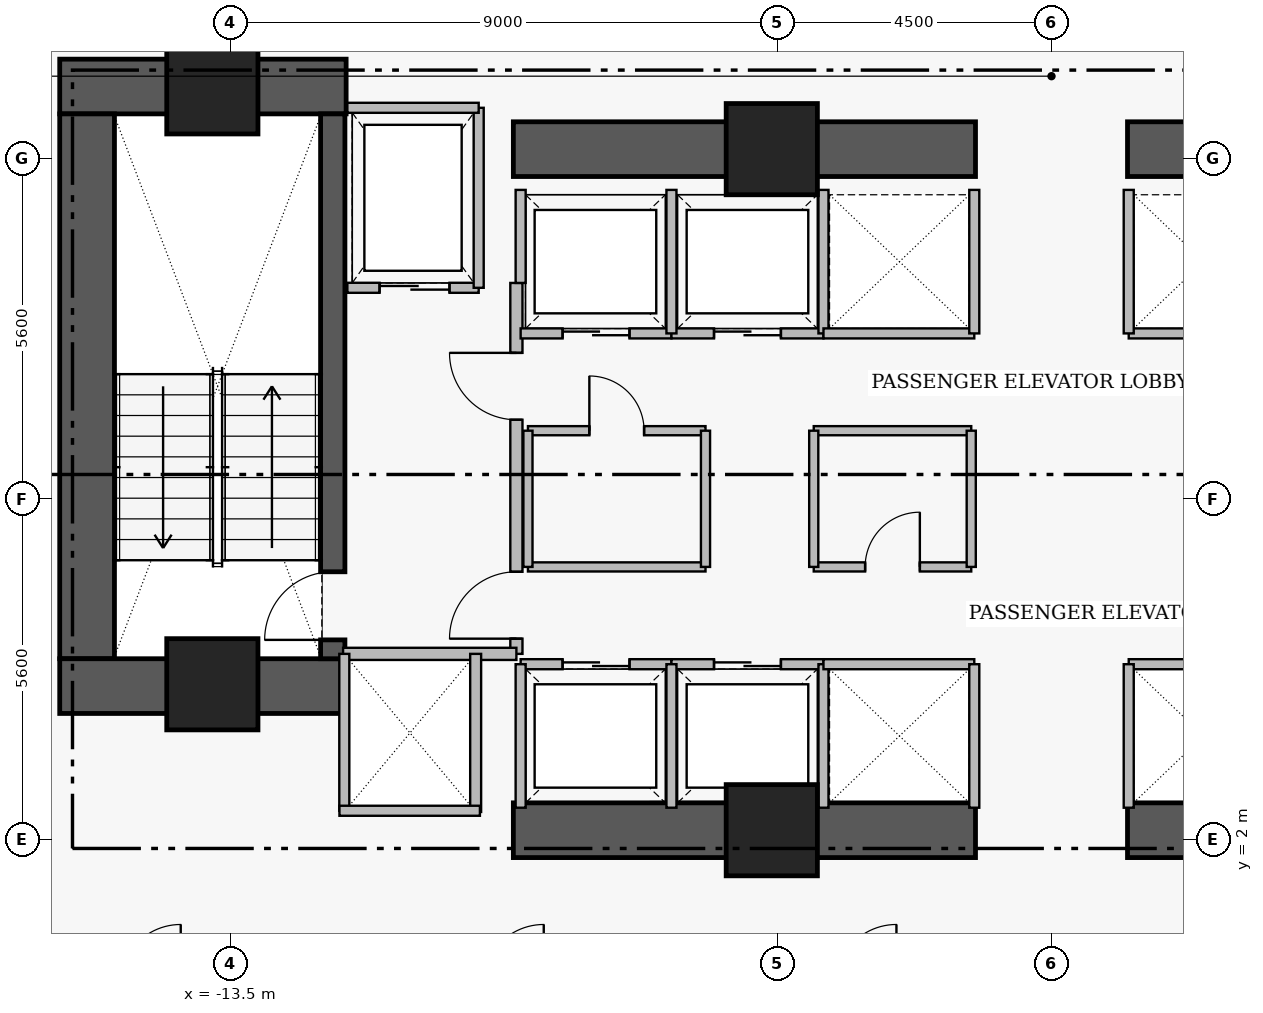
"""IFC4 building model, lengths in metres.
Left out: names, types, materials, properties, quantities, classifications, styles, units other than length and angle.
Written with IfcOpenShell. Run it as: python <this file> out.ifc"""

import sys

from ifc_helpers import new_model, si_unit, direction, frame, frame_2d, origin, origin_2d, place, context, subcontext, project, spatial, rectangle, extrude, element, fill, save


model = new_model("IFC4")
c1 = context("Model", 3, precision=1e-05, world=origin(), true_north=direction((0.0, 1.0)))
c2 = subcontext(c1, "Body", "Model", "MODEL_VIEW")
j1 = project(units=[si_unit("LENGTHUNIT", "METRE"), si_unit("PLANEANGLEUNIT", "RADIAN")], contexts=[c1])
p1 = place(None, origin())
s1 = spatial("IfcSite", under=j1, at=p1, CompositionType="ELEMENT")
p2 = place(p1, origin())
s2 = spatial("IfcBuilding", under=s1, at=p2, CompositionType="ELEMENT")
p3 = place(p2, frame((0.0, 0.0, 27.6)))
s3 = spatial("IfcBuildingStorey", under=s2, at=p3, CompositionType="ELEMENT", Elevation=27.6)
p4 = place(p3, frame((-16.31, 14.38, 0.0), z_axis=(0.0, 0.0, 1.0), x_axis=(1.0, 0.0, 0.0)))
e1 = element("IfcWall", 1, at=p4, inside=s3, PredefinedType="SHEAR", context=c2, shape_type="SweptSolid", body=[
    extrude(rectangle(XDim=4.71, YDim=0.9, at=frame_2d((2.355, 0.0))), origin(), (0.0, 0.0, 1.0), 3.46),
])
p5 = place(p3, frame((-15.86, 4.97, 0.0), z_axis=(0.0, 0.0, 1.0), x_axis=(0.0, 1.0, 0.0)))
e2 = element("IfcWall", 2, at=p5, inside=s3, PredefinedType="SHEAR", context=c2, shape_type="SweptSolid", body=[
    extrude(rectangle(XDim=8.96, YDim=0.9, at=frame_2d((4.48, 0.0))), origin(), (0.0, 0.0, 1.0), 3.46),
])
p6 = place(p3, frame((-16.31, 4.52, 0.0), z_axis=(0.0, 0.0, 1.0), x_axis=(1.0, 0.0, 0.0)))
e3 = element("IfcWall", 3, at=p6, inside=s3, PredefinedType="SHEAR", context=c2, shape_type="SweptSolid", body=[
    extrude(rectangle(XDim=4.71, YDim=0.9, at=frame_2d((2.355, 0.0))), origin(), (0.0, 0.0, 1.0), 3.46),
])
for number, where, z_axis, x_axis in (
    (4, (-8.85, 2.15, 0.0), (0.0, 0.0, 1.0), (1.0, 0.0, 0.0)),
    (5, (1.25, 2.15, 0.0), (0.0, 0.0, 1.0), (1.0, 0.0, 0.0)),
    (6, (-8.85, 13.35, 0.0), (0.0, 0.0, 1.0), (1.0, 0.0, 0.0)),
    (7, (1.25, 13.35, 0.0), (0.0, 0.0, 1.0), (1.0, 0.0, 0.0)),
):
    element("IfcWall", number, at=place(p3, frame(where, z_axis=z_axis, x_axis=x_axis)), inside=s3, PredefinedType="SHEAR", context=c2, shape_type="SweptSolid", body=[
        extrude(rectangle(XDim=7.6, YDim=0.9, at=frame_2d((3.8, 0.0))), origin(), (0.0, 0.0, 1.0), 3.43),
    ])
p7 = place(p3, frame((-11.82, 4.97, 0.0), z_axis=(0.0, 0.0, 1.0), x_axis=(0.0, 1.0, 0.0)))
e8 = element("IfcWall", 8, at=p7, inside=s3, PredefinedType="SHEAR", context=c2, shape_type="SweptSolid", body=[
    extrude(rectangle(XDim=8.96, YDim=0.4, at=frame_2d((4.48, 0.0))), origin(), (0.0, 0.0, 1.0), 3.46),
])
p8 = place(p7, frame((0.31, 0.0, 0.0)))
e9 = element("IfcOpeningElement", 9, at=p8, cuts=e8, PredefinedType="OPENING", context=c2, shape_type="SweptSolid", body=[
    extrude(rectangle(XDim=1.12, YDim=2.22, at=frame_2d((0.56, 1.11))), frame((0.0, 0.21, 0.0), z_axis=(0.0, -1.0, 0.0), x_axis=(1.0, 0.0, 0.0)), (0.0, 0.0, 1.0), 0.42),
])
for number, where, z_axis, x_axis in (
    (10, (-13.8, 14.35, 0.0), (0.0, 0.0, 1.0), (1.0, 0.0, 0.0)),
    (11, (-4.6, 13.35, 0.0), (0.0, 0.0, 1.0), (1.0, 0.0, 0.0)),
    (12, (-13.8, 4.55, 0.0), (0.0, 0.0, 1.0), (1.0, 0.0, 0.0)),
    (13, (-4.6, 2.15, 0.0), (0.0, 0.0, 1.0), (1.0, 0.0, 0.0)),
):
    element("IfcColumn", number, at=place(p3, frame(where, z_axis=z_axis, x_axis=x_axis)), inside=s3, PredefinedType="COLUMN", context=c2, shape_type="SweptSolid", body=[
        extrude(rectangle(XDim=1.5, YDim=1.5, at=origin_2d()), origin(), (0.0, 0.0, 1.0), 3.65),
    ])
p9 = place(p3, frame((-8.8, 5.05, 0.0), z_axis=(0.0, 0.0, 1.0), x_axis=(0.0, 1.0, 0.0)))
e14 = element("IfcWall", 14, at=p9, inside=s3, PredefinedType="PARTITIONING", context=c2, shape_type="SweptSolid", body=[
    extrude(rectangle(XDim=6.1, YDim=0.2, at=frame_2d((3.05, 0.0))), origin(), (0.0, 0.0, 1.0), 3.43),
])
p10 = place(p9, frame((0.25, 0.0, 0.0)))
e15 = element("IfcOpeningElement", 15, at=p10, cuts=e14, PredefinedType="OPENING", context=c2, shape_type="SweptSolid", body=[
    extrude(rectangle(XDim=1.1, YDim=2.2, at=frame_2d((0.55, 1.1))), frame((0.0, 0.11, 0.0), z_axis=(0.0, -1.0, 0.0), x_axis=(1.0, 0.0, 0.0)), (0.0, 0.0, 1.0), 0.22),
])
p11 = place(p9, frame((3.85, 0.0, 0.0)))
e16 = element("IfcOpeningElement", 16, at=p11, cuts=e14, PredefinedType="OPENING", context=c2, shape_type="SweptSolid", body=[
    extrude(rectangle(XDim=1.1, YDim=2.2, at=frame_2d((0.55, 1.1))), frame((0.0, 0.11, 0.0), z_axis=(0.0, -1.0, 0.0), x_axis=(1.0, 0.0, 0.0)), (0.0, 0.0, 1.0), 0.22),
])
p12 = place(p3, frame((-11.58, 11.07, 0.0), z_axis=(0.0, 0.0, 1.0), x_axis=(1.0, 0.0, 0.0)))
e17 = element("IfcWall", 17, at=p12, inside=s3, PredefinedType="PARTITIONING", context=c2, shape_type="SweptSolid", body=[
    extrude(rectangle(XDim=2.16, YDim=0.165, at=frame_2d((1.08, 0.0))), origin(), (0.0, 0.0, 1.0), 3.43),
])
p13 = place(p12, frame((0.53, 0.0, 0.0)))
e18 = element("IfcOpeningElement", 18, at=p13, cuts=e17, PredefinedType="OPENING", context=c2, shape_type="SweptSolid", body=[
    extrude(rectangle(XDim=1.15, YDim=2.25, at=frame_2d((0.575, 1.125))), frame((0.0, 0.093, 0.0), z_axis=(0.0, -1.0, 0.0), x_axis=(1.0, 0.0, 0.0)), (0.0, 0.0, 1.0), 0.185),
])
p14 = place(p3, frame((-8.73, 4.88, 0.0), z_axis=(0.0, 0.0, 1.0), x_axis=(1.0, 0.0, 0.0)))
e19 = element("IfcWall", 19, at=p14, inside=s3, PredefinedType="PARTITIONING", context=c2, shape_type="SweptSolid", body=[
    extrude(rectangle(XDim=2.48, YDim=0.165, at=frame_2d((1.24, 0.0))), origin(), (0.0, 0.0, 1.0), 3.43),
])
p15 = place(p14, frame((0.69, 0.0, 0.0)))
e20 = element("IfcOpeningElement", 20, at=p15, cuts=e19, PredefinedType="OPENING", context=c2, shape_type="SweptSolid", body=[
    extrude(rectangle(XDim=1.1, YDim=2.25, at=frame_2d((0.55, 1.125))), frame((0.0, 0.093, 0.0), z_axis=(0.0, -1.0, 0.0), x_axis=(1.0, 0.0, 0.0)), (0.0, 0.0, 1.0), 0.185),
])
p16 = place(p3, frame((-6.25, 4.88, 0.0), z_axis=(0.0, 0.0, 1.0), x_axis=(1.0, 0.0, 0.0)))
e21 = element("IfcWall", 21, at=p16, inside=s3, PredefinedType="PARTITIONING", context=c2, shape_type="SweptSolid", body=[
    extrude(rectangle(XDim=2.5, YDim=0.165, at=frame_2d((1.25, 0.0))), origin(), (0.0, 0.0, 1.0), 3.43),
])
p17 = place(p16, frame((0.7, 0.0, 0.0)))
e22 = element("IfcOpeningElement", 22, at=p17, cuts=e21, PredefinedType="OPENING", context=c2, shape_type="SweptSolid", body=[
    extrude(rectangle(XDim=1.1, YDim=2.25, at=frame_2d((0.55, 1.125))), frame((0.0, 0.093, 0.0), z_axis=(0.0, -1.0, 0.0), x_axis=(1.0, 0.0, 0.0)), (0.0, 0.0, 1.0), 0.185),
])
p18 = place(p3, frame((-8.73, 10.32, 0.0), z_axis=(0.0, 0.0, 1.0), x_axis=(1.0, 0.0, 0.0)))
e23 = element("IfcWall", 23, at=p18, inside=s3, PredefinedType="PARTITIONING", context=c2, shape_type="SweptSolid", body=[
    extrude(rectangle(XDim=2.48, YDim=0.165, at=frame_2d((1.24, 0.0))), origin(), (0.0, 0.0, 1.0), 3.43),
])
p19 = place(p18, frame((0.69, 0.0, 0.0)))
e24 = element("IfcOpeningElement", 24, at=p19, cuts=e23, PredefinedType="OPENING", context=c2, shape_type="SweptSolid", body=[
    extrude(rectangle(XDim=1.1, YDim=2.25, at=frame_2d((0.55, 1.125))), frame((0.0, 0.093, 0.0), z_axis=(0.0, -1.0, 0.0), x_axis=(1.0, 0.0, 0.0)), (0.0, 0.0, 1.0), 0.185),
])
p20 = place(p3, frame((-6.25, 10.32, 0.0), z_axis=(0.0, 0.0, 1.0), x_axis=(1.0, 0.0, 0.0)))
e25 = element("IfcWall", 25, at=p20, inside=s3, PredefinedType="PARTITIONING", context=c2, shape_type="SweptSolid", body=[
    extrude(rectangle(XDim=2.5, YDim=0.165, at=frame_2d((1.25, 0.0))), origin(), (0.0, 0.0, 1.0), 3.43),
])
p21 = place(p20, frame((0.7, 0.0, 0.0)))
e26 = element("IfcOpeningElement", 26, at=p21, cuts=e25, PredefinedType="OPENING", context=c2, shape_type="SweptSolid", body=[
    extrude(rectangle(XDim=1.1, YDim=2.25, at=frame_2d((0.55, 1.125))), frame((0.0, 0.093, 0.0), z_axis=(0.0, -1.0, 0.0), x_axis=(1.0, 0.0, 0.0)), (0.0, 0.0, 1.0), 0.185),
])
p22 = place(p3, frame((-8.61, 8.72, 0.0), z_axis=(0.0, 0.0, 1.0), x_axis=(1.0, 0.0, 0.0)))
e27 = element("IfcWall", 27, at=p22, inside=s3, PredefinedType="PARTITIONING", context=c2, shape_type="SweptSolid", body=[
    extrude(rectangle(XDim=2.92, YDim=0.15, at=frame_2d((1.46, 0.0))), origin(), (0.0, 0.0, 1.0), 3.43),
])
p23 = place(p22, frame((1.01, 0.0, 0.0)))
e28 = element("IfcOpeningElement", 28, at=p23, cuts=e27, PredefinedType="OPENING", context=c2, shape_type="SweptSolid", body=[
    extrude(rectangle(XDim=0.9, YDim=2.15, at=frame_2d((0.45, 1.075))), frame((0.0, 0.085, 0.0), z_axis=(0.0, -1.0, 0.0), x_axis=(1.0, 0.0, 0.0)), (0.0, 0.0, 1.0), 0.17),
])
p24 = place(p3, frame((-3.91, 6.48, 0.0), z_axis=(0.0, 0.0, 1.0), x_axis=(1.0, 0.0, 0.0)))
e29 = element("IfcWall", 29, at=p24, inside=s3, PredefinedType="PARTITIONING", context=c2, shape_type="SweptSolid", body=[
    extrude(rectangle(XDim=2.59, YDim=0.15, at=frame_2d((1.295, 0.0))), origin(), (0.0, 0.0, 1.0), 3.43),
])
p25 = place(p24, frame((0.845, 0.0, 0.0)))
e30 = element("IfcOpeningElement", 30, at=p25, cuts=e29, PredefinedType="OPENING", context=c2, shape_type="SweptSolid", body=[
    extrude(rectangle(XDim=0.9, YDim=2.15, at=frame_2d((0.45, 1.075))), frame((0.0, 0.085, 0.0), z_axis=(0.0, -1.0, 0.0), x_axis=(1.0, 0.0, 0.0)), (0.0, 0.0, 1.0), 0.17),
])
p26 = place(p3, frame((-11.65, 5.05, 0.0), z_axis=(0.0, 0.0, 1.0), x_axis=(1.0, 0.0, 0.0)))
e31 = element("IfcWall", 31, at=p26, inside=s3, PredefinedType="PARTITIONING", context=c2, shape_type="SweptSolid", body=[
    extrude(rectangle(XDim=2.85, YDim=0.2, at=frame_2d((1.425, 0.0))), origin(), (0.0, 0.0, 1.0), 3.43),
])
p27 = place(p3, frame((-9.42, 11.07, 0.0), z_axis=(0.0, 0.0, 1.0), x_axis=(0.0, 1.0, 0.0)))
e32 = element("IfcWall", 32, at=p27, inside=s3, PredefinedType="PARTITIONING", context=c2, shape_type="SweptSolid", body=[
    extrude(rectangle(XDim=2.96, YDim=0.165, at=frame_2d((1.48, 0.0))), origin(), (0.0, 0.0, 1.0), 3.43),
])
p28 = place(p3, frame((-11.58, 14.03, 0.0), z_axis=(0.0, 0.0, 1.0), x_axis=(1.0, 0.0, 0.0)))
e33 = element("IfcWall", 33, at=p28, inside=s3, PredefinedType="PARTITIONING", context=c2, shape_type="SweptSolid", body=[
    extrude(rectangle(XDim=2.16, YDim=0.165, at=frame_2d((1.08, 0.0))), origin(), (0.0, 0.0, 1.0), 3.43),
])
for number, where, z_axis, x_axis in (
    (34, (-8.73, 2.52, 0.0), (0.0, 0.0, 1.0), (0.0, 1.0, 0.0)),
    (35, (-6.25, 2.52, 0.0), (0.0, 0.0, 1.0), (0.0, 1.0, 0.0)),
    (36, (-3.75, 2.52, 0.0), (0.0, 0.0, 1.0), (0.0, 1.0, 0.0)),
):
    element("IfcWall", number, at=place(p3, frame(where, z_axis=z_axis, x_axis=x_axis)), inside=s3, PredefinedType="PARTITIONING", context=c2, shape_type="SweptSolid", body=[
        extrude(rectangle(XDim=2.36, YDim=0.165, at=frame_2d((1.18, 0.0))), origin(), (0.0, 0.0, 1.0), 3.43),
    ])
p29 = place(p3, frame((-8.73, 11.15, 0.0), z_axis=(0.0, 0.0, 1.0), x_axis=(0.0, 1.0, 0.0)))
e37 = element("IfcWall", 37, at=p29, inside=s3, PredefinedType="PARTITIONING", context=c2, shape_type="SweptSolid", body=[
    extrude(rectangle(XDim=1.53, YDim=0.165, at=frame_2d((0.765, 0.0))), origin(), (0.0, 0.0, 1.0), 3.43),
])
for number, where, z_axis, x_axis in (
    (38, (-6.25, 10.32, 0.0), (0.0, 0.0, 1.0), (0.0, 1.0, 0.0)),
    (39, (-3.75, 10.32, 0.0), (0.0, 0.0, 1.0), (0.0, 1.0, 0.0)),
):
    element("IfcWall", number, at=place(p3, frame(where, z_axis=z_axis, x_axis=x_axis)), inside=s3, PredefinedType="PARTITIONING", context=c2, shape_type="SweptSolid", body=[
        extrude(rectangle(XDim=2.36, YDim=0.165, at=frame_2d((1.18, 0.0))), origin(), (0.0, 0.0, 1.0), 3.43),
    ])
p30 = place(p3, frame((-3.75, 4.88, 0.0), z_axis=(0.0, 0.0, 1.0), x_axis=(1.0, 0.0, 0.0)))
e40 = element("IfcWall", 40, at=p30, inside=s3, PredefinedType="PARTITIONING", context=c2, shape_type="SweptSolid", body=[
    extrude(rectangle(XDim=2.48, YDim=0.165, at=frame_2d((1.24, 0.0))), origin(), (0.0, 0.0, 1.0), 3.43),
])
p31 = place(p3, frame((-1.27, 2.52, 0.0), z_axis=(0.0, 0.0, 1.0), x_axis=(0.0, 1.0, 0.0)))
e41 = element("IfcWall", 41, at=p31, inside=s3, PredefinedType="PARTITIONING", context=c2, shape_type="SweptSolid", body=[
    extrude(rectangle(XDim=2.36, YDim=0.165, at=frame_2d((1.18, 0.0))), origin(), (0.0, 0.0, 1.0), 3.43),
])
p32 = place(p3, frame((1.27, 4.88, 0.0), z_axis=(0.0, 0.0, 1.0), x_axis=(1.0, 0.0, 0.0)))
e42 = element("IfcWall", 42, at=p32, inside=s3, PredefinedType="PARTITIONING", context=c2, shape_type="SweptSolid", body=[
    extrude(rectangle(XDim=2.48, YDim=0.165, at=frame_2d((1.24, 0.0))), origin(), (0.0, 0.0, 1.0), 3.43),
])
p33 = place(p3, frame((1.27, 2.52, 0.0), z_axis=(0.0, 0.0, 1.0), x_axis=(0.0, 1.0, 0.0)))
e43 = element("IfcWall", 43, at=p33, inside=s3, PredefinedType="PARTITIONING", context=c2, shape_type="SweptSolid", body=[
    extrude(rectangle(XDim=2.36, YDim=0.165, at=frame_2d((1.18, 0.0))), origin(), (0.0, 0.0, 1.0), 3.43),
])
p34 = place(p3, frame((-3.75, 10.32, 0.0), z_axis=(0.0, 0.0, 1.0), x_axis=(1.0, 0.0, 0.0)))
e44 = element("IfcWall", 44, at=p34, inside=s3, PredefinedType="PARTITIONING", context=c2, shape_type="SweptSolid", body=[
    extrude(rectangle(XDim=2.48, YDim=0.165, at=frame_2d((1.24, 0.0))), origin(), (0.0, 0.0, 1.0), 3.43),
])
p35 = place(p3, frame((-1.27, 10.32, 0.0), z_axis=(0.0, 0.0, 1.0), x_axis=(0.0, 1.0, 0.0)))
e45 = element("IfcWall", 45, at=p35, inside=s3, PredefinedType="PARTITIONING", context=c2, shape_type="SweptSolid", body=[
    extrude(rectangle(XDim=2.36, YDim=0.165, at=frame_2d((1.18, 0.0))), origin(), (0.0, 0.0, 1.0), 3.43),
])
p36 = place(p3, frame((1.27, 10.32, 0.0), z_axis=(0.0, 0.0, 1.0), x_axis=(1.0, 0.0, 0.0)))
e46 = element("IfcWall", 46, at=p36, inside=s3, PredefinedType="PARTITIONING", context=c2, shape_type="SweptSolid", body=[
    extrude(rectangle(XDim=2.48, YDim=0.165, at=frame_2d((1.24, 0.0))), origin(), (0.0, 0.0, 1.0), 3.43),
])
p37 = place(p3, frame((1.27, 10.32, 0.0), z_axis=(0.0, 0.0, 1.0), x_axis=(0.0, 1.0, 0.0)))
e47 = element("IfcWall", 47, at=p37, inside=s3, PredefinedType="PARTITIONING", context=c2, shape_type="SweptSolid", body=[
    extrude(rectangle(XDim=2.36, YDim=0.165, at=frame_2d((1.18, 0.0))), origin(), (0.0, 0.0, 1.0), 3.43),
])
p38 = place(p3, frame((-9.47, 2.45, 0.0), z_axis=(0.0, 0.0, 1.0), x_axis=(0.0, 1.0, 0.0)))
e48 = element("IfcWall", 48, at=p38, inside=s3, PredefinedType="PARTITIONING", context=c2, shape_type="SweptSolid", body=[
    extrude(rectangle(XDim=2.6, YDim=0.18, at=frame_2d((1.3, 0.0))), origin(), (0.0, 0.0, 1.0), 3.43),
])
p39 = place(p3, frame((-11.63, 2.47, 0.0), z_axis=(0.0, 0.0, 1.0), x_axis=(0.0, 1.0, 0.0)))
e49 = element("IfcWall", 49, at=p39, inside=s3, PredefinedType="PARTITIONING", context=c2, shape_type="SweptSolid", body=[
    extrude(rectangle(XDim=2.58, YDim=0.165, at=frame_2d((1.29, 0.0))), origin(), (0.0, 0.0, 1.0), 3.43),
])
p40 = place(p3, frame((-11.71, 2.47, 0.0), z_axis=(0.0, 0.0, 1.0), x_axis=(1.0, 0.0, 0.0)))
e50 = element("IfcWall", 50, at=p40, inside=s3, PredefinedType="PARTITIONING", context=c2, shape_type="SweptSolid", body=[
    extrude(rectangle(XDim=2.31, YDim=0.165, at=frame_2d((1.155, 0.0))), origin(), (0.0, 0.0, 1.0), 2.03),
])
p41 = place(p3, frame((-8.61, 6.48, 0.0), z_axis=(0.0, 0.0, 1.0), x_axis=(1.0, 0.0, 0.0)))
e51 = element("IfcWall", 51, at=p41, inside=s3, PredefinedType="PARTITIONING", context=c2, shape_type="SweptSolid", body=[
    extrude(rectangle(XDim=2.92, YDim=0.15, at=frame_2d((1.46, 0.0))), origin(), (0.0, 0.0, 1.0), 3.43),
])
for number, where, z_axis, x_axis in (
    (52, (-8.61, 6.48, 0.0), (0.0, 0.0, 1.0), (0.0, 1.0, 0.0)),
    (53, (-5.69, 6.48, 0.0), (0.0, 0.0, 1.0), (0.0, 1.0, 0.0)),
):
    element("IfcWall", number, at=place(p3, frame(where, z_axis=z_axis, x_axis=x_axis)), inside=s3, PredefinedType="PARTITIONING", context=c2, shape_type="SweptSolid", body=[
        extrude(rectangle(XDim=2.24, YDim=0.15, at=frame_2d((1.12, 0.0))), origin(), (0.0, 0.0, 1.0), 3.43),
    ])
p42 = place(p3, frame((-3.91, 8.72, 0.0), z_axis=(0.0, 0.0, 1.0), x_axis=(1.0, 0.0, 0.0)))
e54 = element("IfcWall", 54, at=p42, inside=s3, PredefinedType="PARTITIONING", context=c2, shape_type="SweptSolid", body=[
    extrude(rectangle(XDim=2.59, YDim=0.15, at=frame_2d((1.295, 0.0))), origin(), (0.0, 0.0, 1.0), 3.43),
])
for number, where, z_axis, x_axis in (
    (55, (-3.91, 6.48, 0.0), (0.0, 0.0, 1.0), (0.0, 1.0, 0.0)),
    (56, (-1.32, 6.48, 0.0), (0.0, 0.0, 1.0), (0.0, 1.0, 0.0)),
):
    element("IfcWall", number, at=place(p3, frame(where, z_axis=z_axis, x_axis=x_axis)), inside=s3, PredefinedType="PARTITIONING", context=c2, shape_type="SweptSolid", body=[
        extrude(rectangle(XDim=2.24, YDim=0.15, at=frame_2d((1.12, 0.0))), origin(), (0.0, 0.0, 1.0), 3.43),
    ])
p43 = place(p8, origin())
e57 = element("IfcDoor", 57, at=p43, inside=s3, OperationType="SINGLE_SWING_LEFT", PredefinedType="DOOR", context=c2, shape_type="SweptSolid", body=[
    extrude(rectangle(XDim=1.12, YDim=2.22, at=frame_2d((0.56, 1.11))), frame((0.0, 0.025, 0.0), z_axis=(0.0, -1.0, 0.0), x_axis=(1.0, 0.0, 0.0)), (0.0, 0.0, 1.0), 0.05),
])
fill(e9, e57)
p44 = place(p10, origin())
e58 = element("IfcDoor", 58, at=p44, inside=s3, OperationType="SINGLE_SWING_LEFT", PredefinedType="DOOR", context=c2, shape_type="SweptSolid", body=[
    extrude(rectangle(XDim=1.1, YDim=2.2, at=frame_2d((0.55, 1.1))), frame((0.0, 0.025, 0.0), z_axis=(0.0, -1.0, 0.0), x_axis=(1.0, 0.0, 0.0)), (0.0, 0.0, 1.0), 0.05),
])
fill(e15, e58)
p45 = place(p11, origin())
e59 = element("IfcDoor", 59, at=p45, inside=s3, OperationType="SINGLE_SWING_RIGHT", PredefinedType="DOOR", context=c2, shape_type="SweptSolid", body=[
    extrude(rectangle(XDim=1.1, YDim=2.2, at=frame_2d((0.55, 1.1))), frame((0.0, 0.025, 0.0), z_axis=(0.0, -1.0, 0.0), x_axis=(1.0, 0.0, 0.0)), (0.0, 0.0, 1.0), 0.05),
])
fill(e16, e59)
p46 = place(p13, origin())
e60 = element("IfcDoor", 60, at=p46, inside=s3, OperationType="SLIDING_TO_LEFT", PredefinedType="DOOR", context=c2, shape_type="SweptSolid", body=[
    extrude(rectangle(XDim=1.15, YDim=2.25, at=frame_2d((0.575, 1.125))), frame((0.0, 0.025, 0.0), z_axis=(0.0, -1.0, 0.0), x_axis=(1.0, 0.0, 0.0)), (0.0, 0.0, 1.0), 0.05),
])
fill(e18, e60)
p47 = place(p15, origin())
e61 = element("IfcDoor", 61, at=p47, inside=s3, OperationType="SLIDING_TO_LEFT", PredefinedType="DOOR", context=c2, shape_type="SweptSolid", body=[
    extrude(rectangle(XDim=1.1, YDim=2.25, at=frame_2d((0.55, 1.125))), frame((0.0, 0.025, 0.0), z_axis=(0.0, -1.0, 0.0), x_axis=(1.0, 0.0, 0.0)), (0.0, 0.0, 1.0), 0.05),
])
fill(e20, e61)
p48 = place(p17, origin())
e62 = element("IfcDoor", 62, at=p48, inside=s3, OperationType="SLIDING_TO_LEFT", PredefinedType="DOOR", context=c2, shape_type="SweptSolid", body=[
    extrude(rectangle(XDim=1.1, YDim=2.25, at=frame_2d((0.55, 1.125))), frame((0.0, 0.025, 0.0), z_axis=(0.0, -1.0, 0.0), x_axis=(1.0, 0.0, 0.0)), (0.0, 0.0, 1.0), 0.05),
])
fill(e22, e62)
p49 = place(p19, origin())
e63 = element("IfcDoor", 63, at=p49, inside=s3, OperationType="SLIDING_TO_LEFT", PredefinedType="DOOR", context=c2, shape_type="SweptSolid", body=[
    extrude(rectangle(XDim=1.1, YDim=2.25, at=frame_2d((0.55, 1.125))), frame((0.0, 0.025, 0.0), z_axis=(0.0, -1.0, 0.0), x_axis=(1.0, 0.0, 0.0)), (0.0, 0.0, 1.0), 0.05),
])
fill(e24, e63)
p50 = place(p21, origin())
e64 = element("IfcDoor", 64, at=p50, inside=s3, OperationType="SLIDING_TO_LEFT", PredefinedType="DOOR", context=c2, shape_type="SweptSolid", body=[
    extrude(rectangle(XDim=1.1, YDim=2.25, at=frame_2d((0.55, 1.125))), frame((0.0, 0.025, 0.0), z_axis=(0.0, -1.0, 0.0), x_axis=(1.0, 0.0, 0.0)), (0.0, 0.0, 1.0), 0.05),
])
fill(e26, e64)
p51 = place(p23, origin())
e65 = element("IfcDoor", 65, at=p51, inside=s3, OperationType="SINGLE_SWING_LEFT", PredefinedType="DOOR", context=c2, shape_type="SweptSolid", body=[
    extrude(rectangle(XDim=0.9, YDim=2.15, at=frame_2d((0.45, 1.075))), frame((0.0, 0.025, 0.0), z_axis=(0.0, -1.0, 0.0), x_axis=(1.0, 0.0, 0.0)), (0.0, 0.0, 1.0), 0.05),
])
fill(e28, e65)
p52 = place(p25, origin())
e66 = element("IfcDoor", 66, at=p52, inside=s3, OperationType="SINGLE_SWING_RIGHT", PredefinedType="DOOR", context=c2, shape_type="SweptSolid", body=[
    extrude(rectangle(XDim=0.9, YDim=2.15, at=frame_2d((0.45, 1.075))), frame((0.0, 0.025, 0.0), z_axis=(0.0, -1.0, 0.0), x_axis=(1.0, 0.0, 0.0)), (0.0, 0.0, 1.0), 0.05),
])
fill(e30, e66)
save(model, sys.argv[1])
